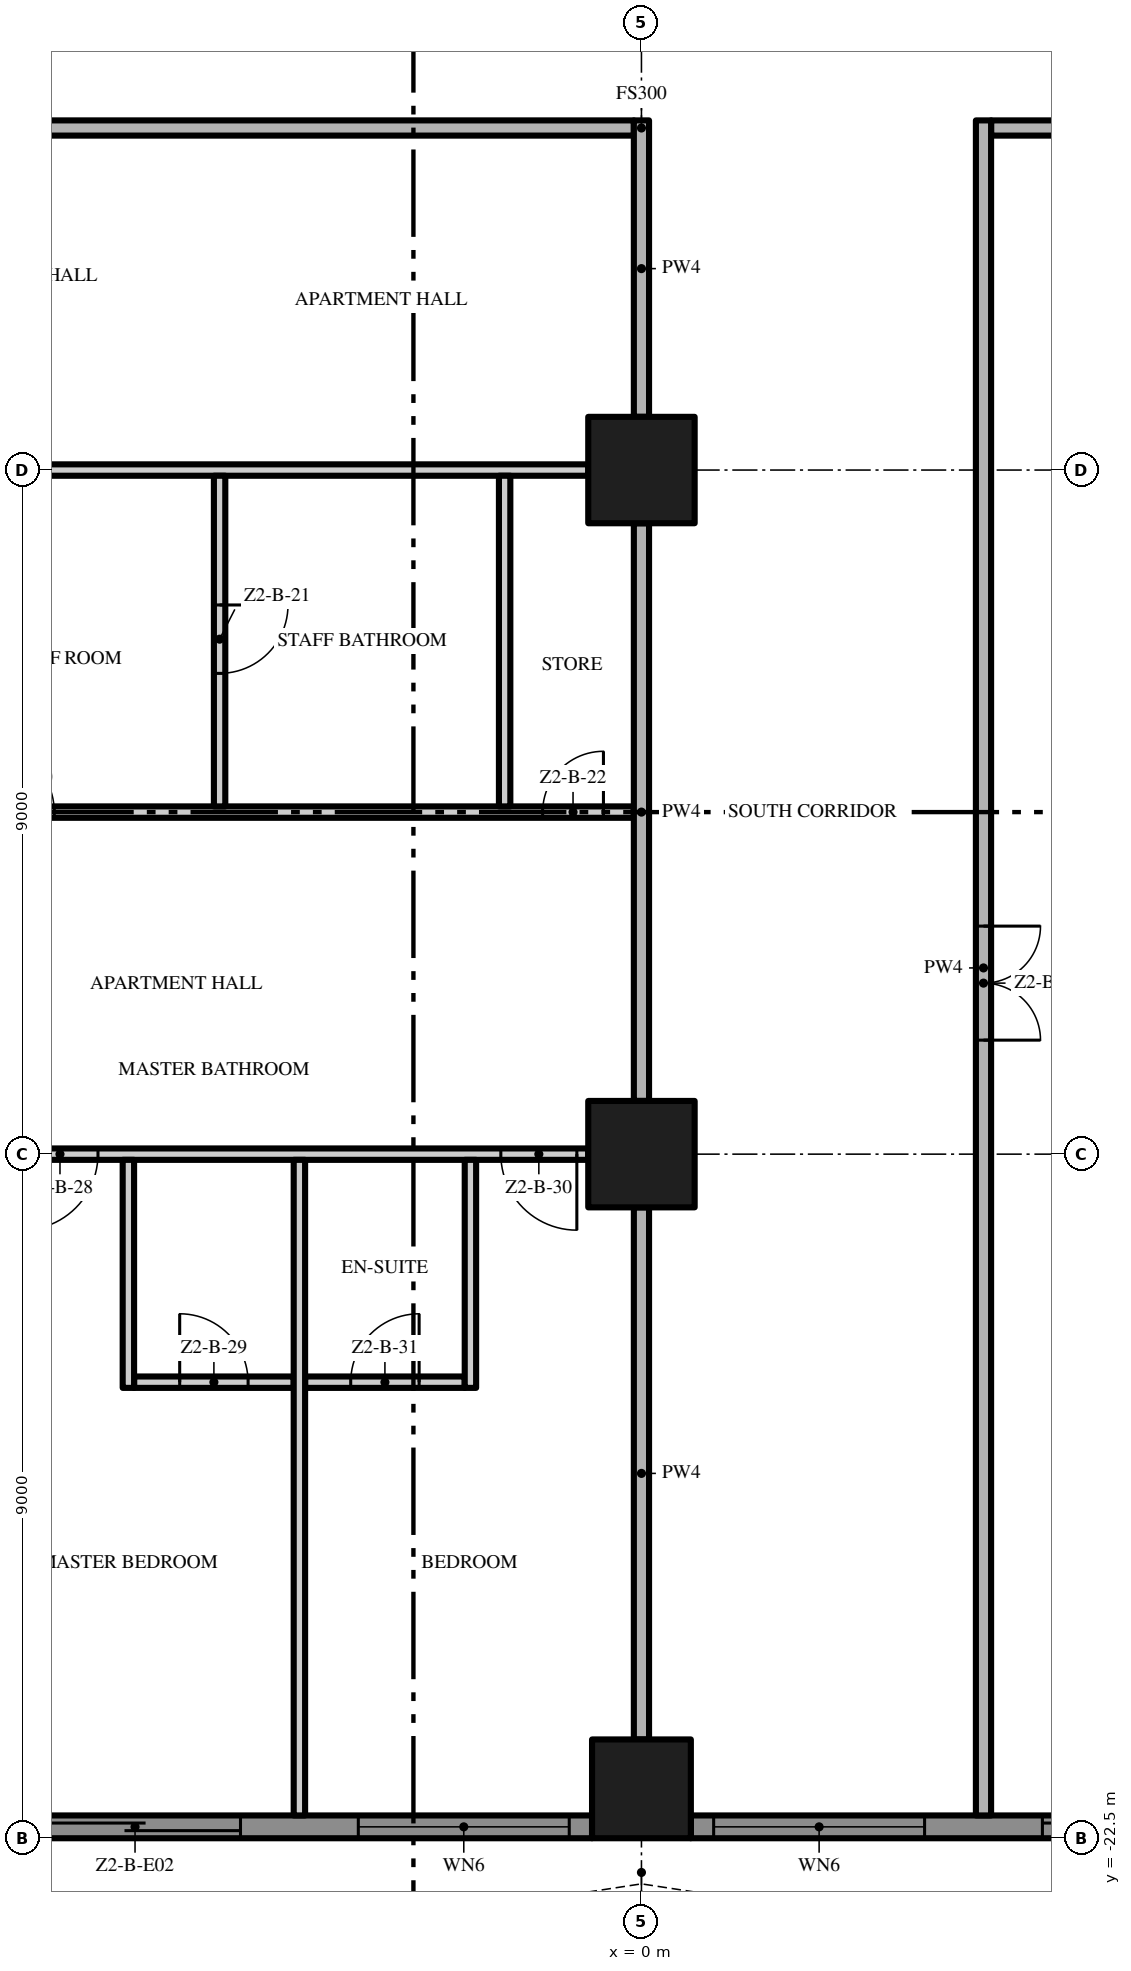
"""IFC4 building model, lengths in metres.
Left out: names, types, materials, properties, quantities, classifications, styles, units other than length and angle.
Written with IfcOpenShell. Run it as: python <this file> out.ifc"""

import sys

from ifc_helpers import new_model, si_unit, direction, frame, frame_2d, origin, origin_2d, place, context, subcontext, project, spatial, polyline, rectangle, outline, extrude, element, fill, save


model = new_model("IFC4")
c1 = context("Model", 3, precision=1e-05, world=origin(), true_north=direction((0.0, 1.0)))
c2 = subcontext(c1, "Body", "Model", "MODEL_VIEW")
j1 = project(units=[si_unit("LENGTHUNIT", "METRE"), si_unit("PLANEANGLEUNIT", "RADIAN")], contexts=[c1])
p1 = place(None, origin())
s1 = spatial("IfcSite", under=j1, at=p1, CompositionType="ELEMENT")
p2 = place(p1, origin())
s2 = spatial("IfcBuilding", under=s1, at=p2, CompositionType="ELEMENT")
p3 = place(p2, frame((0.0, 0.0, 84.6)))
s3 = spatial("IfcBuildingStorey", under=s2, at=p3, CompositionType="ELEMENT", Elevation=84.6)
p4 = place(p3, frame((0.0, -13.5, 0.0), z_axis=(0.0, 0.0, 1.0), x_axis=(1.0, 0.0, 0.0)))
e1 = element("IfcColumn", 1, at=p4, inside=s3, PredefinedType="COLUMN", context=c2, shape_type="SweptSolid", body=[
    extrude(rectangle(XDim=1.4, YDim=1.4, at=origin_2d()), origin(), (0.0, 0.0, 1.0), 3.5),
])
p5 = place(p3, frame((0.0, -21.85, 0.0), z_axis=(0.0, 0.0, 1.0), x_axis=(1.0, 0.0, 0.0)))
e2 = element("IfcColumn", 2, at=p5, inside=s3, PredefinedType="COLUMN", context=c2, shape_type="SweptSolid", body=[
    extrude(rectangle(XDim=1.3, YDim=1.3, at=origin_2d()), origin(), (0.0, 0.0, 1.0), 3.5),
])
p6 = place(p3, frame((0.0, -4.5, 0.0), z_axis=(0.0, 0.0, 1.0), x_axis=(1.0, 0.0, 0.0)))
e3 = element("IfcColumn", 3, at=p6, inside=s3, PredefinedType="COLUMN", context=c2, shape_type="SweptSolid", body=[
    extrude(rectangle(XDim=1.4, YDim=1.4, at=origin_2d()), origin(), (0.0, 0.0, 1.0), 3.5),
])
p7 = place(p3, frame((-0.65, -22.35, 0.0), z_axis=(0.0, 0.0, 1.0), x_axis=(-1.0, 0.0, 0.0)))
e4 = element("IfcWall", 4, at=p7, inside=s3, PredefinedType="SOLIDWALL", context=c2, shape_type="SweptSolid", body=[
    extrude(rectangle(XDim=7.7, YDim=0.3, at=frame_2d((3.85, 0.0))), origin(), (0.0, 0.0, 1.0), 3.5),
])
p8 = place(p7, frame((4.625, 0.0, 0.0)))
e5 = element("IfcOpeningElement", 5, at=p8, cuts=e4, PredefinedType="OPENING", context=c2, shape_type="SweptSolid", body=[
    extrude(rectangle(XDim=2.775, YDim=2.4, at=frame_2d((1.387, 1.2))), frame((0.0, 0.16, 0.0), z_axis=(0.0, -1.0, 0.0), x_axis=(1.0, 0.0, 0.0)), (0.0, 0.0, 1.0), 0.32),
])
p9 = place(p7, frame((0.3, 0.0, 0.45)))
e6 = element("IfcOpeningElement", 6, at=p9, cuts=e4, PredefinedType="OPENING", context=c2, shape_type="SweptSolid", body=[
    extrude(rectangle(XDim=2.775, YDim=2.65, at=frame_2d((1.387, 1.325))), frame((0.0, 0.16, 0.0), z_axis=(0.0, -1.0, 0.0), x_axis=(1.0, 0.0, 0.0)), (0.0, 0.0, 1.0), 0.32),
])
p10 = place(p3, frame((8.35, -22.35, 0.0), z_axis=(0.0, 0.0, 1.0), x_axis=(-1.0, 0.0, 0.0)))
e7 = element("IfcWall", 7, at=p10, inside=s3, PredefinedType="SOLIDWALL", context=c2, shape_type="SweptSolid", body=[
    extrude(rectangle(XDim=7.7, YDim=0.3, at=frame_2d((3.85, 0.0))), origin(), (0.0, 0.0, 1.0), 3.5),
])
p11 = place(p10, frame((4.625, 0.0, 0.45)))
e8 = element("IfcOpeningElement", 8, at=p11, cuts=e7, PredefinedType="OPENING", context=c2, shape_type="SweptSolid", body=[
    extrude(rectangle(XDim=2.775, YDim=2.65, at=frame_2d((1.387, 1.325))), frame((0.0, 0.16, 0.0), z_axis=(0.0, -1.0, 0.0), x_axis=(1.0, 0.0, 0.0)), (0.0, 0.0, 1.0), 0.32),
])
p12 = place(p10, frame((0.3, 0.0, 0.0)))
e9 = element("IfcOpeningElement", 9, at=p12, cuts=e7, PredefinedType="OPENING", context=c2, shape_type="SweptSolid", body=[
    extrude(rectangle(XDim=2.775, YDim=2.4, at=frame_2d((1.387, 1.2))), frame((0.0, 0.16, 0.0), z_axis=(0.0, -1.0, 0.0), x_axis=(1.0, 0.0, 0.0)), (0.0, 0.0, 1.0), 0.32),
])
p13 = place(p3, origin())
e10 = element("IfcWall", 10, at=p13, inside=s3, PredefinedType="USERDEFINED", context=c2, shape_type="SweptSolid", body=[
    extrude(outline(polyline([(-22.5, -25.5), (-21.0, -25.271), (-19.5, -24.671), (-18.0, -23.929), (-16.5, -23.329), (-15.0, -23.1), (-13.5, -23.329), (-12.0, -23.929), (-10.5, -24.671), (-9.0, -25.271), (-7.5, -25.5), (-6.0, -25.271), (-4.5, -24.671), (-3.0, -23.929), (-1.5, -23.329), (0.0, -23.1), (1.5, -23.329), (3.0, -23.929), (4.5, -24.671), (6.0, -25.271), (7.5, -25.5), (9.0, -25.271), (10.5, -24.671), (12.0, -23.929), (13.5, -23.329), (15.0, -23.1), (16.5, -23.329), (18.0, -23.929), (19.5, -24.671), (21.0, -25.271), (22.5, -25.5), (22.538, -25.253), (21.066, -25.028), (19.602, -24.442), (18.102, -23.701), (16.566, -23.086), (15.0, -22.847), (13.434, -23.086), (11.898, -23.701), (10.398, -24.442), (8.934, -25.028), (7.5, -25.247), (6.066, -25.028), (4.602, -24.442), (3.102, -23.701), (1.566, -23.086), (0.0, -22.847), (-1.566, -23.086), (-3.102, -23.701), (-4.602, -24.442), (-6.066, -25.028), (-7.5, -25.247), (-8.934, -25.028), (-10.398, -24.442), (-11.898, -23.701), (-13.434, -23.086), (-15.0, -22.847), (-16.566, -23.086), (-18.102, -23.701), (-19.602, -24.442), (-21.066, -25.028), (-22.538, -25.253), (-22.5, -25.5)])), origin(), (0.0, 0.0, 1.0), 0.9),
])
p14 = place(p3, frame((-6.675, -16.5, 0.0), z_axis=(0.0, 0.0, 1.0), x_axis=(1.0, 0.0, 0.0)))
e11 = element("IfcWall", 11, at=p14, inside=s3, PredefinedType="PARTITIONING", context=c2, shape_type="SweptSolid", body=[
    extrude(rectangle(XDim=2.1, YDim=0.15, at=frame_2d((1.05, 0.0))), origin(), (0.0, 0.0, 1.0), 3.5),
])
p15 = place(p14, frame((0.6, 0.0, 0.0)))
e12 = element("IfcOpeningElement", 12, at=p15, cuts=e11, PredefinedType="OPENING", context=c2, shape_type="SweptSolid", body=[
    extrude(rectangle(XDim=0.9, YDim=2.1, at=frame_2d((0.45, 1.05))), frame((0.0, 0.085, 0.0), z_axis=(0.0, -1.0, 0.0), x_axis=(1.0, 0.0, 0.0)), (0.0, 0.0, 1.0), 0.17),
])
p16 = place(p3, frame((-4.425, -16.5, 0.0), z_axis=(0.0, 0.0, 1.0), x_axis=(1.0, 0.0, 0.0)))
e13 = element("IfcWall", 13, at=p16, inside=s3, PredefinedType="PARTITIONING", context=c2, shape_type="SweptSolid", body=[
    extrude(rectangle(XDim=2.1, YDim=0.15, at=frame_2d((1.05, 0.0))), origin(), (0.0, 0.0, 1.0), 3.5),
])
p17 = place(p16, frame((0.6, 0.0, 0.0)))
e14 = element("IfcOpeningElement", 14, at=p17, cuts=e13, PredefinedType="OPENING", context=c2, shape_type="SweptSolid", body=[
    extrude(rectangle(XDim=0.9, YDim=2.1, at=frame_2d((0.45, 1.05))), frame((0.0, 0.085, 0.0), z_axis=(0.0, -1.0, 0.0), x_axis=(1.0, 0.0, 0.0)), (0.0, 0.0, 1.0), 0.17),
])
p18 = place(p3, frame((-0.7, -13.5, 0.0), z_axis=(0.0, 0.0, 1.0), x_axis=(-1.0, 0.0, 0.0)))
e15 = element("IfcWall", 15, at=p18, inside=s3, PredefinedType="PARTITIONING", context=c2, shape_type="SweptSolid", body=[
    extrude(rectangle(XDim=7.6, YDim=0.15, at=frame_2d((3.8, 0.0))), origin(), (0.0, 0.0, 1.0), 3.5),
])
p19 = place(p18, frame((6.45, 0.0, 0.0)))
e16 = element("IfcOpeningElement", 16, at=p19, cuts=e15, PredefinedType="OPENING", context=c2, shape_type="SweptSolid", body=[
    extrude(rectangle(XDim=1.0, YDim=2.4, at=frame_2d((0.5, 1.2))), frame((0.0, 0.085, 0.0), z_axis=(0.0, -1.0, 0.0), x_axis=(1.0, 0.0, 0.0)), (0.0, 0.0, 1.0), 0.17),
])
p20 = place(p18, frame((0.15, 0.0, 0.0)))
e17 = element("IfcOpeningElement", 17, at=p20, cuts=e15, PredefinedType="OPENING", context=c2, shape_type="SweptSolid", body=[
    extrude(rectangle(XDim=1.0, YDim=2.4, at=frame_2d((0.5, 1.2))), frame((0.0, 0.085, 0.0), z_axis=(0.0, -1.0, 0.0), x_axis=(1.0, 0.0, 0.0)), (0.0, 0.0, 1.0), 0.17),
])
p21 = place(p3, frame((-10.725, -9.0, 0.0), z_axis=(0.0, 0.0, 1.0), x_axis=(1.0, 0.0, 0.0)))
e18 = element("IfcWall", 18, at=p21, inside=s3, PredefinedType="PARTITIONING", context=c2, shape_type="SweptSolid", body=[
    extrude(rectangle(XDim=10.625, YDim=0.15, at=frame_2d((5.312, 0.0))), origin(), (0.0, 0.0, 1.0), 3.5),
])
p22 = place(p21, frame((2.1, 0.0, 0.0)))
e19 = element("IfcOpeningElement", 19, at=p22, cuts=e18, PredefinedType="OPENING", context=c2, shape_type="SweptSolid", body=[
    extrude(rectangle(XDim=0.9, YDim=2.1, at=frame_2d((0.45, 1.05))), frame((0.0, 0.085, 0.0), z_axis=(0.0, -1.0, 0.0), x_axis=(1.0, 0.0, 0.0)), (0.0, 0.0, 1.0), 0.17),
])
p23 = place(p21, frame((9.425, 0.0, 0.0)))
e20 = element("IfcOpeningElement", 20, at=p23, cuts=e18, PredefinedType="OPENING", context=c2, shape_type="SweptSolid", body=[
    extrude(rectangle(XDim=0.8, YDim=2.0, at=frame_2d((0.4, 1.0))), frame((0.0, 0.085, 0.0), z_axis=(0.0, -1.0, 0.0), x_axis=(1.0, 0.0, 0.0)), (0.0, 0.0, 1.0), 0.17),
])
p24 = place(p3, frame((-8.3, -4.5, 0.0), z_axis=(0.0, 0.0, 1.0), x_axis=(1.0, 0.0, 0.0)))
e21 = element("IfcWall", 21, at=p24, inside=s3, PredefinedType="PARTITIONING", context=c2, shape_type="SweptSolid", body=[
    extrude(rectangle(XDim=7.6, YDim=0.15, at=frame_2d((3.8, 0.0))), origin(), (0.0, 0.0, 1.0), 3.5),
])
p25 = place(p3, frame((-0.1, 0.0, 0.0), z_axis=(0.0, 0.0, 1.0), x_axis=(-1.0, 0.0, 0.0)))
e22 = element("IfcWall", 22, at=p25, inside=s3, PredefinedType="PARTITIONING", context=c2, shape_type="SweptSolid", body=[
    extrude(rectangle(XDim=17.3, YDim=0.2, at=frame_2d((8.65, 0.0))), origin(), (0.0, 0.0, 1.0), 3.5),
])
p26 = place(p25, frame((8.15, 0.0, 0.0)))
e23 = element("IfcOpeningElement", 23, at=p26, cuts=e22, PredefinedType="OPENING", context=c2, shape_type="SweptSolid", body=[
    extrude(rectangle(XDim=1.5, YDim=2.4, at=frame_2d((0.75, 1.2))), frame((0.0, 0.11, 0.0), z_axis=(0.0, -1.0, 0.0), x_axis=(1.0, 0.0, 0.0)), (0.0, 0.0, 1.0), 0.22),
])
p27 = place(p3, frame((4.6, 0.0, 0.0), z_axis=(0.0, 0.0, 1.0), x_axis=(1.0, 0.0, 0.0)))
e24 = element("IfcWall", 24, at=p27, inside=s3, PredefinedType="PARTITIONING", context=c2, shape_type="SweptSolid", body=[
    extrude(rectangle(XDim=12.8, YDim=0.2, at=frame_2d((6.4, 0.0))), origin(), (0.0, 0.0, 1.0), 3.5),
])
p28 = place(p3, frame((-6.75, -16.575, 0.0), z_axis=(0.0, 0.0, 1.0), x_axis=(0.0, 1.0, 0.0)))
e25 = element("IfcWall", 25, at=p28, inside=s3, PredefinedType="PARTITIONING", context=c2, shape_type="SweptSolid", body=[
    extrude(rectangle(XDim=3.0, YDim=0.15, at=frame_2d((1.5, 0.0))), origin(), (0.0, 0.0, 1.0), 3.5),
])
p29 = place(p3, frame((-5.55, -4.575, 0.0), z_axis=(0.0, 0.0, 1.0), x_axis=(0.0, -1.0, 0.0)))
e26 = element("IfcWall", 26, at=p29, inside=s3, PredefinedType="PARTITIONING", context=c2, shape_type="SweptSolid", body=[
    extrude(rectangle(XDim=4.35, YDim=0.15, at=frame_2d((2.175, 0.0))), origin(), (0.0, 0.0, 1.0), 3.5),
])
p30 = place(p29, frame((1.7, 0.0, 0.0)))
e27 = element("IfcOpeningElement", 27, at=p30, cuts=e26, PredefinedType="OPENING", context=c2, shape_type="SweptSolid", body=[
    extrude(rectangle(XDim=0.9, YDim=2.1, at=frame_2d((0.45, 1.05))), frame((0.0, 0.085, 0.0), z_axis=(0.0, -1.0, 0.0), x_axis=(1.0, 0.0, 0.0)), (0.0, 0.0, 1.0), 0.17),
])
p31 = place(p3, frame((-4.5, -22.2, 0.0), z_axis=(0.0, 0.0, 1.0), x_axis=(0.0, 1.0, 0.0)))
e28 = element("IfcWall", 28, at=p31, inside=s3, PredefinedType="PARTITIONING", context=c2, shape_type="SweptSolid", body=[
    extrude(rectangle(XDim=8.625, YDim=0.15, at=frame_2d((4.312, 0.0))), origin(), (0.0, 0.0, 1.0), 3.5),
])
p32 = place(p3, frame((-2.25, -16.575, 0.0), z_axis=(0.0, 0.0, 1.0), x_axis=(0.0, 1.0, 0.0)))
e29 = element("IfcWall", 29, at=p32, inside=s3, PredefinedType="PARTITIONING", context=c2, shape_type="SweptSolid", body=[
    extrude(rectangle(XDim=3.0, YDim=0.15, at=frame_2d((1.5, 0.0))), origin(), (0.0, 0.0, 1.0), 3.5),
])
p33 = place(p3, frame((-1.8, -8.925, 0.0), z_axis=(0.0, 0.0, 1.0), x_axis=(0.0, 1.0, 0.0)))
e30 = element("IfcWall", 30, at=p33, inside=s3, PredefinedType="PARTITIONING", context=c2, shape_type="SweptSolid", body=[
    extrude(rectangle(XDim=4.35, YDim=0.15, at=frame_2d((2.175, 0.0))), origin(), (0.0, 0.0, 1.0), 3.5),
])
p34 = place(p3, frame((0.0, -21.2, 0.0), z_axis=(0.0, 0.0, 1.0), x_axis=(0.0, 1.0, 0.0)))
e31 = element("IfcWall", 31, at=p34, inside=s3, PredefinedType="PARTITIONING", context=c2, shape_type="SweptSolid", body=[
    extrude(rectangle(XDim=7.0, YDim=0.2, at=frame_2d((3.5, 0.0))), origin(), (0.0, 0.0, 1.0), 3.5),
])
p35 = place(p3, frame((0.0, -12.8, 0.0), z_axis=(0.0, 0.0, 1.0), x_axis=(0.0, 1.0, 0.0)))
e32 = element("IfcWall", 32, at=p35, inside=s3, PredefinedType="PARTITIONING", context=c2, shape_type="SweptSolid", body=[
    extrude(rectangle(XDim=7.6, YDim=0.2, at=frame_2d((3.8, 0.0))), origin(), (0.0, 0.0, 1.0), 3.5),
])
p36 = place(p3, frame((0.0, -3.8, 0.0), z_axis=(0.0, 0.0, 1.0), x_axis=(0.0, 1.0, 0.0)))
e33 = element("IfcWall", 33, at=p36, inside=s3, PredefinedType="PARTITIONING", context=c2, shape_type="SweptSolid", body=[
    extrude(rectangle(XDim=3.9, YDim=0.2, at=frame_2d((1.95, 0.0))), origin(), (0.0, 0.0, 1.0), 3.5),
])
p37 = place(p3, frame((4.5, 0.1, 0.0), z_axis=(0.0, 0.0, 1.0), x_axis=(0.0, -1.0, 0.0)))
e34 = element("IfcWall", 34, at=p37, inside=s3, PredefinedType="PARTITIONING", context=c2, shape_type="SweptSolid", body=[
    extrude(rectangle(XDim=22.3, YDim=0.2, at=frame_2d((11.15, 0.0))), origin(), (0.0, 0.0, 1.0), 3.5),
])
p38 = place(p37, frame((10.6, 0.0, 0.0)))
e35 = element("IfcOpeningElement", 35, at=p38, cuts=e34, PredefinedType="OPENING", context=c2, shape_type="SweptSolid", body=[
    extrude(rectangle(XDim=1.5, YDim=2.4, at=frame_2d((0.75, 1.2))), frame((0.0, 0.11, 0.0), z_axis=(0.0, -1.0, 0.0), x_axis=(1.0, 0.0, 0.0)), (0.0, 0.0, 1.0), 0.22),
])
p39 = place(p8, origin())
e36 = element("IfcDoor", 36, at=p39, inside=s3, OperationType="SINGLE_SWING_LEFT", PredefinedType="DOOR", context=c2, shape_type="SweptSolid", body=[
    extrude(rectangle(XDim=2.775, YDim=2.4, at=frame_2d((1.387, 1.2))), frame((0.0, 0.025, 0.0), z_axis=(0.0, -1.0, 0.0), x_axis=(1.0, 0.0, 0.0)), (0.0, 0.0, 1.0), 0.05),
])
fill(e5, e36)
p40 = place(p9, origin())
e37 = element("IfcWindow", 37, at=p40, inside=s3, PartitioningType="SINGLE_PANEL", PredefinedType="WINDOW", context=c2, shape_type="SweptSolid", body=[
    extrude(rectangle(XDim=2.775, YDim=2.65, at=frame_2d((1.387, 1.325))), frame((0.0, 0.03, 0.0), z_axis=(0.0, -1.0, 0.0), x_axis=(1.0, 0.0, 0.0)), (0.0, 0.0, 1.0), 0.06),
])
fill(e6, e37)
p41 = place(p11, origin())
e38 = element("IfcWindow", 38, at=p41, inside=s3, PartitioningType="SINGLE_PANEL", PredefinedType="WINDOW", context=c2, shape_type="SweptSolid", body=[
    extrude(rectangle(XDim=2.775, YDim=2.65, at=frame_2d((1.387, 1.325))), frame((0.0, 0.03, 0.0), z_axis=(0.0, -1.0, 0.0), x_axis=(1.0, 0.0, 0.0)), (0.0, 0.0, 1.0), 0.06),
])
fill(e8, e38)
p42 = place(p12, origin())
e39 = element("IfcDoor", 39, at=p42, inside=s3, OperationType="SINGLE_SWING_LEFT", PredefinedType="DOOR", context=c2, shape_type="SweptSolid", body=[
    extrude(rectangle(XDim=2.775, YDim=2.4, at=frame_2d((1.387, 1.2))), frame((0.0, 0.025, 0.0), z_axis=(0.0, -1.0, 0.0), x_axis=(1.0, 0.0, 0.0)), (0.0, 0.0, 1.0), 0.05),
])
fill(e9, e39)
p43 = place(p22, origin())
e40 = element("IfcDoor", 40, at=p43, inside=s3, OperationType="SINGLE_SWING_LEFT", PredefinedType="DOOR", context=c2, shape_type="SweptSolid", body=[
    extrude(rectangle(XDim=0.9, YDim=2.1, at=frame_2d((0.45, 1.05))), frame((0.0, 0.025, 0.0), z_axis=(0.0, -1.0, 0.0), x_axis=(1.0, 0.0, 0.0)), (0.0, 0.0, 1.0), 0.05),
])
fill(e19, e40)
p44 = place(p30, origin())
e41 = element("IfcDoor", 41, at=p44, inside=s3, OperationType="SINGLE_SWING_LEFT", PredefinedType="DOOR", context=c2, shape_type="SweptSolid", body=[
    extrude(rectangle(XDim=0.9, YDim=2.1, at=frame_2d((0.45, 1.05))), frame((0.0, 0.025, 0.0), z_axis=(0.0, -1.0, 0.0), x_axis=(1.0, 0.0, 0.0)), (0.0, 0.0, 1.0), 0.05),
])
fill(e27, e41)
p45 = place(p23, origin())
e42 = element("IfcDoor", 42, at=p45, inside=s3, OperationType="SINGLE_SWING_RIGHT", PredefinedType="DOOR", context=c2, shape_type="SweptSolid", body=[
    extrude(rectangle(XDim=0.8, YDim=2.0, at=frame_2d((0.4, 1.0))), frame((0.0, 0.025, 0.0), z_axis=(0.0, -1.0, 0.0), x_axis=(1.0, 0.0, 0.0)), (0.0, 0.0, 1.0), 0.05),
])
fill(e20, e42)
p46 = place(p19, origin())
e43 = element("IfcDoor", 43, at=p46, inside=s3, OperationType="SINGLE_SWING_RIGHT", PredefinedType="DOOR", context=c2, shape_type="SweptSolid", body=[
    extrude(rectangle(XDim=1.0, YDim=2.4, at=frame_2d((0.5, 1.2))), frame((0.0, 0.025, 0.0), z_axis=(0.0, -1.0, 0.0), x_axis=(1.0, 0.0, 0.0)), (0.0, 0.0, 1.0), 0.05),
])
fill(e16, e43)
p47 = place(p15, origin())
e44 = element("IfcDoor", 44, at=p47, inside=s3, OperationType="SINGLE_SWING_LEFT", PredefinedType="DOOR", context=c2, shape_type="SweptSolid", body=[
    extrude(rectangle(XDim=0.9, YDim=2.1, at=frame_2d((0.45, 1.05))), frame((0.0, 0.025, 0.0), z_axis=(0.0, -1.0, 0.0), x_axis=(1.0, 0.0, 0.0)), (0.0, 0.0, 1.0), 0.05),
])
fill(e12, e44)
p48 = place(p20, origin())
e45 = element("IfcDoor", 45, at=p48, inside=s3, OperationType="SINGLE_SWING_LEFT", PredefinedType="DOOR", context=c2, shape_type="SweptSolid", body=[
    extrude(rectangle(XDim=1.0, YDim=2.4, at=frame_2d((0.5, 1.2))), frame((0.0, 0.025, 0.0), z_axis=(0.0, -1.0, 0.0), x_axis=(1.0, 0.0, 0.0)), (0.0, 0.0, 1.0), 0.05),
])
fill(e17, e45)
p49 = place(p17, origin())
e46 = element("IfcDoor", 46, at=p49, inside=s3, OperationType="SINGLE_SWING_RIGHT", PredefinedType="DOOR", context=c2, shape_type="SweptSolid", body=[
    extrude(rectangle(XDim=0.9, YDim=2.1, at=frame_2d((0.45, 1.05))), frame((0.0, 0.025, 0.0), z_axis=(0.0, -1.0, 0.0), x_axis=(1.0, 0.0, 0.0)), (0.0, 0.0, 1.0), 0.05),
])
fill(e14, e46)
p50 = place(p38, origin())
e47 = element("IfcDoor", 47, at=p50, inside=s3, OperationType="DOUBLE_DOOR_SINGLE_SWING", PredefinedType="DOOR", context=c2, shape_type="SweptSolid", body=[
    extrude(rectangle(XDim=1.5, YDim=2.4, at=frame_2d((0.75, 1.2))), frame((0.0, 0.025, 0.0), z_axis=(0.0, -1.0, 0.0), x_axis=(1.0, 0.0, 0.0)), (0.0, 0.0, 1.0), 0.05),
])
fill(e35, e47)
save(model, sys.argv[1])
